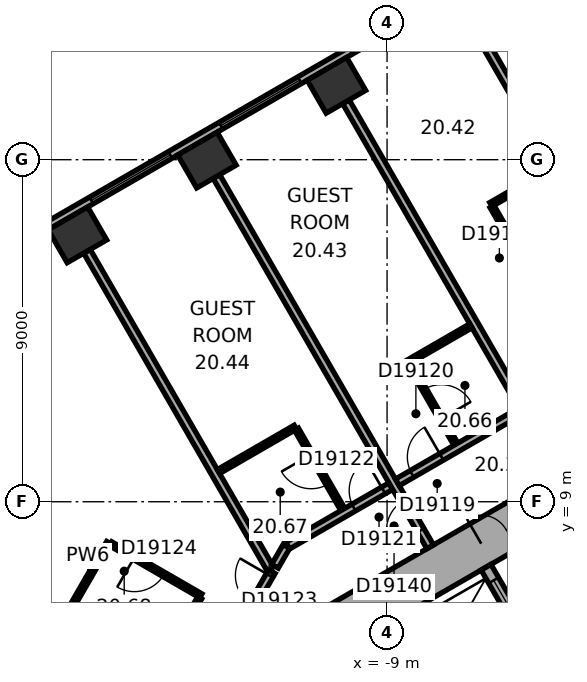
"""IFC4 building model, lengths in metres.
Left out: names, types, materials, properties, quantities, classifications, styles, units other than length and angle.
Written with IfcOpenShell. Run it as: python <this file> out.ifc"""

import sys

from ifc_helpers import new_model, si_unit, direction, frame, frame_2d, origin, origin_2d, place, context, subcontext, project, spatial, rectangle, extrude, element, fill, save


model = new_model("IFC4")
c1 = context("Model", 3, precision=1e-05, world=origin(), true_north=direction((0.0, 1.0)))
c2 = subcontext(c1, "Body", "Model", "MODEL_VIEW")
j1 = project(units=[si_unit("LENGTHUNIT", "METRE"), si_unit("PLANEANGLEUNIT", "RADIAN")], contexts=[c1])
p1 = place(None, origin())
s1 = spatial("IfcSite", under=j1, at=p1, CompositionType="ELEMENT")
p2 = place(p1, origin())
s2 = spatial("IfcBuilding", under=s1, at=p2, CompositionType="ELEMENT")
p3 = place(p2, frame((0.0, 0.0, 90.2)))
s3 = spatial("IfcBuildingStorey", under=s2, at=p3, CompositionType="ELEMENT", Elevation=90.2)
for number, where, z_axis, x_axis in (
    (1, (-10.333, 19.957, 0.0), (0.0, 0.0, 1.0), (-0.866, -0.5, 0.0)),
    (2, (-13.74, 17.99, 0.0), (0.0, 0.0, 1.0), (-0.866, -0.5, 0.0)),
    (3, (-17.148, 16.023, 0.0), (0.0, 0.0, 1.0), (-0.866, -0.5, 0.0)),
):
    element("IfcColumn", number, at=place(p3, frame(where, z_axis=z_axis, x_axis=x_axis)), inside=s3, PredefinedType="COLUMN", context=c2, shape_type="SweptSolid", body=[
        extrude(rectangle(XDim=1.2, YDim=1.0, at=origin_2d()), origin(), (0.0, 0.0, 1.0), 3.3),
    ])
p4 = place(p3, frame((0.3, 11.836, 0.0), z_axis=(0.0, 0.0, 1.0), x_axis=(-0.866021384402, -0.500006961711, 0.0)))
e4 = element("IfcWall", 4, at=p4, inside=s3, PredefinedType="SHEAR", context=c2, shape_type="SweptSolid", body=[
    extrude(rectangle(XDim=12.355, YDim=1.2, at=frame_2d((6.178, 0.0))), origin(), (0.0, 0.0, 1.0), 3.3),
])
p5 = place(p4, frame((6.378, 0.0, 0.0)))
e5 = element("IfcOpeningElement", 5, at=p5, cuts=e4, PredefinedType="OPENING", context=c2, shape_type="SweptSolid", body=[
    extrude(rectangle(XDim=1.5, YDim=2.1, at=frame_2d((0.75, 1.05))), frame((0.0, 0.61, 0.0), z_axis=(0.0, -1.0, 0.0), x_axis=(1.0, 0.0, 0.0)), (0.0, 0.0, 1.0), 1.22),
])
p6 = place(p4, frame((1.828, 0.0, 0.0)))
e6 = element("IfcOpeningElement", 6, at=p6, cuts=e4, PredefinedType="OPENING", context=c2, shape_type="SweptSolid", body=[
    extrude(rectangle(XDim=1.1, YDim=2.1, at=frame_2d((0.55, 1.05))), frame((0.0, 0.61, 0.0), z_axis=(0.0, -1.0, 0.0), x_axis=(1.0, 0.0, 0.0)), (0.0, 0.0, 1.0), 1.22),
])
p7 = place(p3, frame((-3.136, 24.805, 0.0), z_axis=(0.0, 0.0, 1.0), x_axis=(-0.866028291626, -0.499994998079, 0.0)))
e7 = element("IfcWall", 7, at=p7, inside=s3, PredefinedType="STANDARD", context=c2, shape_type="SweptSolid", body=[
    extrude(rectangle(XDim=21.246, YDim=0.2, at=frame_2d((10.623, 0.0))), origin(), (0.0, 0.0, 1.0), 3.3),
])
p8 = place(p7, frame((1.555, 0.0, 0.8)))
e8 = element("IfcOpeningElement", 8, at=p8, cuts=e7, PredefinedType="OPENING", context=c2, shape_type="SweptSolid", body=[
    extrude(rectangle(XDim=2.4, YDim=1.7, at=frame_2d((1.2, 0.85))), frame((0.0, 0.11, 0.0), z_axis=(0.0, -1.0, 0.0), x_axis=(1.0, 0.0, 0.0)), (0.0, 0.0, 1.0), 0.22),
])
p9 = place(p7, frame((5.489, 0.0, 0.8)))
e9 = element("IfcOpeningElement", 9, at=p9, cuts=e7, PredefinedType="OPENING", context=c2, shape_type="SweptSolid", body=[
    extrude(rectangle(XDim=2.4, YDim=1.7, at=frame_2d((1.2, 0.85))), frame((0.0, 0.11, 0.0), z_axis=(0.0, -1.0, 0.0), x_axis=(1.0, 0.0, 0.0)), (0.0, 0.0, 1.0), 0.22),
])
p10 = place(p7, frame((9.424, 0.0, 0.8)))
e10 = element("IfcOpeningElement", 10, at=p10, cuts=e7, PredefinedType="OPENING", context=c2, shape_type="SweptSolid", body=[
    extrude(rectangle(XDim=2.4, YDim=1.7, at=frame_2d((1.2, 0.85))), frame((0.0, 0.11, 0.0), z_axis=(0.0, -1.0, 0.0), x_axis=(1.0, 0.0, 0.0)), (0.0, 0.0, 1.0), 0.22),
])
p11 = place(p7, frame((13.358, 0.0, 0.8)))
e11 = element("IfcOpeningElement", 11, at=p11, cuts=e7, PredefinedType="OPENING", context=c2, shape_type="SweptSolid", body=[
    extrude(rectangle(XDim=2.4, YDim=1.7, at=frame_2d((1.2, 0.85))), frame((0.0, 0.11, 0.0), z_axis=(0.0, -1.0, 0.0), x_axis=(1.0, 0.0, 0.0)), (0.0, 0.0, 1.0), 0.22),
])
p12 = place(p7, frame((17.293, 0.0, 0.8)))
e12 = element("IfcOpeningElement", 12, at=p12, cuts=e7, PredefinedType="OPENING", context=c2, shape_type="SweptSolid", body=[
    extrude(rectangle(XDim=2.4, YDim=1.7, at=frame_2d((1.2, 0.85))), frame((0.0, 0.11, 0.0), z_axis=(0.0, -1.0, 0.0), x_axis=(1.0, 0.0, 0.0)), (0.0, 0.0, 1.0), 0.22),
])
p13 = place(p3, frame((-5.295, 5.372, 0.0), z_axis=(0.0, 0.0, 1.0), x_axis=(-0.500077893725, 0.86598042715, 0.0)))
e13 = element("IfcWall", 13, at=p13, inside=s3, PredefinedType="SHEAR", context=c2, shape_type="SweptSolid", body=[
    extrude(rectangle(XDim=2.2, YDim=0.3, at=frame_2d((1.1, 0.0))), origin(), (0.0, 0.0, 1.0), 3.05),
])
p14 = place(p13, frame((0.7, 0.0, 0.0)))
e14 = element("IfcOpeningElement", 14, at=p14, cuts=e13, PredefinedType="OPENING", context=c2, shape_type="SweptSolid", body=[
    extrude(rectangle(XDim=1.1, YDim=2.1, at=frame_2d((0.55, 1.05))), frame((0.0, 0.16, 0.0), z_axis=(0.0, -1.0, 0.0), x_axis=(1.0, 0.0, 0.0)), (0.0, 0.0, 1.0), 0.32),
])
p15 = place(p3, frame((-17.426, 6.019, 0.0), z_axis=(0.0, 0.0, 1.0), x_axis=(0.50002983664, 0.866008176907, 0.0)))
e15 = element("IfcWall", 15, at=p15, inside=s3, PredefinedType="PARTITIONING", context=c2, shape_type="SweptSolid", body=[
    extrude(rectangle(XDim=2.2, YDim=0.12, at=frame_2d((1.1, 0.0))), origin(), (0.0, 0.0, 1.0), 3.05),
])
p16 = place(p3, frame((-16.898, 15.59, 0.0), z_axis=(0.0, 0.0, 1.0), x_axis=(0.499994742786, -0.866028439017, 0.0)))
e16 = element("IfcWall", 16, at=p16, inside=s3, PredefinedType="PARTITIONING", context=c2, shape_type="SweptSolid", body=[
    extrude(rectangle(XDim=9.65, YDim=0.2, at=frame_2d((4.825, 0.0))), origin(), (0.0, 0.0, 1.0), 3.05),
])
p17 = place(p3, frame((-16.274, 7.895, 0.0), z_axis=(0.0, 0.0, 1.0), x_axis=(0.865997131366, -0.500048966069, 0.0)))
e17 = element("IfcWall", 17, at=p17, inside=s3, PredefinedType="PARTITIONING", context=c2, shape_type="SweptSolid", body=[
    extrude(rectangle(XDim=2.74, YDim=0.12, at=frame_2d((1.37, 0.0))), origin(), (0.0, 0.0, 1.0), 3.05),
])
p18 = place(p17, frame((0.72, 0.0, 0.0)))
e18 = element("IfcOpeningElement", 18, at=p18, cuts=e17, PredefinedType="OPENING", context=c2, shape_type="SweptSolid", body=[
    extrude(rectangle(XDim=0.9, YDim=2.1, at=frame_2d((0.45, 1.05))), frame((0.0, 0.07, 0.0), z_axis=(0.0, -1.0, 0.0), x_axis=(1.0, 0.0, 0.0)), (0.0, 0.0, 1.0), 0.14),
])
p19 = place(p3, frame((-13.931, 6.472, 0.0), z_axis=(0.0, 0.0, 1.0), x_axis=(-0.499739399214, -0.866175809448, 0.0)))
e19 = element("IfcWall", 19, at=p19, inside=s3, PredefinedType="PARTITIONING", context=c2, shape_type="SweptSolid", body=[
    extrude(rectangle(XDim=0.416, YDim=0.12, at=frame_2d((0.208, 0.0))), origin(), (0.0, 0.0, 1.0), 3.05),
])
p20 = place(p3, frame((-13.436, 9.794, 0.0), z_axis=(0.0, 0.0, 1.0), x_axis=(0.866053246676, 0.499951771596, 0.0)))
e20 = element("IfcWall", 20, at=p20, inside=s3, PredefinedType="PARTITIONING", context=c2, shape_type="SweptSolid", body=[
    extrude(rectangle(XDim=2.335, YDim=0.12, at=frame_2d((1.167, 0.0))), origin(), (0.0, 0.0, 1.0), 3.05),
])
p21 = place(p3, frame((-12.032, 7.162, 0.0), z_axis=(0.0, 0.0, 1.0), x_axis=(-0.499951829968, -0.866053212979, 0.0)))
e21 = element("IfcWall", 21, at=p21, inside=s3, PredefinedType="PARTITIONING", context=c2, shape_type="SweptSolid", body=[
    extrude(rectangle(XDim=1.136, YDim=0.2, at=frame_2d((0.568, 0.0))), origin(), (0.0, 0.0, 1.0), 3.05),
])
p22 = place(p21, frame((0.118, 0.0, 0.0)))
e22 = element("IfcOpeningElement", 22, at=p22, cuts=e21, PredefinedType="OPENING", context=c2, shape_type="SweptSolid", body=[
    extrude(rectangle(XDim=0.9, YDim=2.1, at=frame_2d((0.45, 1.05))), frame((0.0, 0.11, 0.0), z_axis=(0.0, -1.0, 0.0), x_axis=(1.0, 0.0, 0.0)), (0.0, 0.0, 1.0), 0.22),
])
p23 = place(p3, frame((-11.65, 7.823, 0.0), z_axis=(0.0, 0.0, 1.0), x_axis=(-0.50012165622, -0.865955154139, 0.0)))
e23 = element("IfcWall", 23, at=p23, inside=s3, PredefinedType="PARTITIONING", context=c2, shape_type="SweptSolid", body=[
    extrude(rectangle(XDim=0.6, YDim=0.2, at=frame_2d((0.3, 0.0))), origin(), (0.0, 0.0, 1.0), 3.05),
])
p24 = place(p3, frame((-11.385, 10.909, 0.0), z_axis=(0.0, 0.0, 1.0), x_axis=(0.500077547548, -0.865980627057, 0.0)))
e24 = element("IfcWall", 24, at=p24, inside=s3, PredefinedType="PARTITIONING", context=c2, shape_type="SweptSolid", body=[
    extrude(rectangle(XDim=2.44, YDim=0.12, at=frame_2d((1.22, 0.0))), origin(), (0.0, 0.0, 1.0), 3.05),
])
p25 = place(p24, frame((0.77, 0.0, 0.0)))
e25 = element("IfcOpeningElement", 25, at=p25, cuts=e24, PredefinedType="OPENING", context=c2, shape_type="SweptSolid", body=[
    extrude(rectangle(XDim=0.9, YDim=2.1, at=frame_2d((0.45, 1.05))), frame((0.0, 0.07, 0.0), z_axis=(0.0, -1.0, 0.0), x_axis=(1.0, 0.0, 0.0)), (0.0, 0.0, 1.0), 0.14),
])
p26 = place(p3, frame((-10.083, 19.524, 0.0), z_axis=(0.0, 0.0, 1.0), x_axis=(0.499999662836, -0.866025598446, 0.0)))
e26 = element("IfcWall", 26, at=p26, inside=s3, PredefinedType="PARTITIONING", context=c2, shape_type="SweptSolid", body=[
    extrude(rectangle(XDim=9.25, YDim=0.2, at=frame_2d((4.625, 0.0))), origin(), (0.0, 0.0, 1.0), 2.6),
])
p27 = place(p3, frame((-8.902, 9.41, 0.0), z_axis=(0.0, 0.0, 1.0), x_axis=(-0.866014299198, -0.500019233215, 0.0)))
e27 = element("IfcWall", 27, at=p27, inside=s3, PredefinedType="PARTITIONING", context=c2, shape_type="SweptSolid", body=[
    extrude(rectangle(XDim=3.133, YDim=0.2, at=frame_2d((1.567, 0.0))), origin(), (0.0, 0.0, 1.0), 3.05),
])
p28 = place(p27, frame((0.225, 0.0, 0.0)))
e28 = element("IfcOpeningElement", 28, at=p28, cuts=e27, PredefinedType="OPENING", context=c2, shape_type="SweptSolid", body=[
    extrude(rectangle(XDim=0.9, YDim=2.1, at=frame_2d((0.45, 1.05))), frame((0.0, 0.11, 0.0), z_axis=(0.0, -1.0, 0.0), x_axis=(1.0, 0.0, 0.0)), (0.0, 0.0, 1.0), 0.22),
])
p29 = place(p3, frame((-8.44, 12.679, 0.0), z_axis=(0.0, 0.0, 1.0), x_axis=(0.866044365799, 0.499967155389, 0.0)))
e29 = element("IfcWall", 29, at=p29, inside=s3, PredefinedType="PARTITIONING", context=c2, shape_type="SweptSolid", body=[
    extrude(rectangle(XDim=1.9, YDim=0.12, at=frame_2d((0.95, 0.0))), origin(), (0.0, 0.0, 1.0), 3.05),
])
p30 = place(p3, frame((-7.865, 7.814, 0.0), z_axis=(0.0, 0.0, 1.0), x_axis=(-0.500004234368, 0.866022959057, 0.0)))
e30 = element("IfcWall", 30, at=p30, inside=s3, PredefinedType="PARTITIONING", context=c2, shape_type="SweptSolid", body=[
    extrude(rectangle(XDim=11.25, YDim=0.2, at=frame_2d((5.625, 0.0))), origin(), (0.0, 0.0, 1.0), 3.05),
])
p31 = place(p30, frame((0.5, 0.0, 0.0)))
e31 = element("IfcOpeningElement", 31, at=p31, cuts=e30, PredefinedType="OPENING", context=c2, shape_type="SweptSolid", body=[
    extrude(rectangle(XDim=0.9, YDim=2.1, at=frame_2d((0.45, 1.05))), frame((0.0, 0.11, 0.0), z_axis=(0.0, -1.0, 0.0), x_axis=(1.0, 0.0, 0.0)), (0.0, 0.0, 1.0), 0.22),
])
p32 = place(p3, frame((-7.19, 10.513, 0.0), z_axis=(0.0, 0.0, 1.0), x_axis=(-0.499959183527, 0.866048967903, 0.0)))
e32 = element("IfcWall", 32, at=p32, inside=s3, PredefinedType="PARTITIONING", context=c2, shape_type="SweptSolid", body=[
    extrude(rectangle(XDim=2.44, YDim=0.12, at=frame_2d((1.22, 0.0))), origin(), (0.0, 0.0, 1.0), 3.05),
])
p33 = place(p32, frame((0.77, 0.0, 0.0)))
e33 = element("IfcOpeningElement", 33, at=p33, cuts=e32, PredefinedType="OPENING", context=c2, shape_type="SweptSolid", body=[
    extrude(rectangle(XDim=0.9, YDim=2.1, at=frame_2d((0.45, 1.05))), frame((0.0, 0.07, 0.0), z_axis=(0.0, -1.0, 0.0), x_axis=(1.0, 0.0, 0.0)), (0.0, 0.0, 1.0), 0.14),
])
p34 = place(p3, frame((-6.676, 21.492, 0.0), z_axis=(0.0, 0.0, 1.0), x_axis=(0.500011263043, -0.866018900966, 0.0)))
e34 = element("IfcWall", 34, at=p34, inside=s3, PredefinedType="PARTITIONING", context=c2, shape_type="SweptSolid", body=[
    extrude(rectangle(XDim=8.049, YDim=0.2, at=frame_2d((4.024, 0.0))), origin(), (0.0, 0.0, 1.0), 3.05),
])
p35 = place(p3, frame((-6.268, 16.82, 0.0), z_axis=(0.0, 0.0, 1.0), x_axis=(0.866002662425, 0.500039387122, 0.0)))
e35 = element("IfcWall", 35, at=p35, inside=s3, PredefinedType="PARTITIONING", context=c2, shape_type="SweptSolid", body=[
    extrude(rectangle(XDim=1.4, YDim=0.12, at=frame_2d((0.7, 0.0))), origin(), (0.0, 0.0, 1.0), 3.05),
])
p36 = place(p3, frame((-4.968, 14.569, 0.0), z_axis=(0.0, 0.0, 1.0), x_axis=(-0.500046963369, 0.865998287773, 0.0)))
e36 = element("IfcWall", 36, at=p36, inside=s3, PredefinedType="PARTITIONING", context=c2, shape_type="SweptSolid", body=[
    extrude(rectangle(XDim=2.54, YDim=0.12, at=frame_2d((1.27, 0.0))), origin(), (0.0, 0.0, 1.0), 3.05),
])
p37 = place(p36, frame((0.82, 0.0, 0.0)))
e37 = element("IfcOpeningElement", 37, at=p37, cuts=e36, PredefinedType="OPENING", context=c2, shape_type="SweptSolid", body=[
    extrude(rectangle(XDim=0.9, YDim=2.1, at=frame_2d((0.45, 1.05))), frame((0.0, 0.07, 0.0), z_axis=(0.0, -1.0, 0.0), x_axis=(1.0, 0.0, 0.0)), (0.0, 0.0, 1.0), 0.14),
])
p38 = place(p3, frame((-4.309, 12.061, 0.0), z_axis=(0.0, 0.0, 1.0), x_axis=(-0.866020679205, -0.500008183122, 0.0)))
e38 = element("IfcWall", 38, at=p38, inside=s3, PredefinedType="PARTITIONING", context=c2, shape_type="SweptSolid", body=[
    extrude(rectangle(XDim=5.104, YDim=0.2, at=frame_2d((2.552, 0.0))), origin(), (0.0, 0.0, 1.0), 3.05),
])
p39 = place(p38, frame((0.185, 0.0, 0.0)))
e39 = element("IfcOpeningElement", 39, at=p39, cuts=e38, PredefinedType="OPENING", context=c2, shape_type="SweptSolid", body=[
    extrude(rectangle(XDim=0.9, YDim=2.1, at=frame_2d((0.45, 1.05))), frame((0.0, 0.11, 0.0), z_axis=(0.0, -1.0, 0.0), x_axis=(1.0, 0.0, 0.0)), (0.0, 0.0, 1.0), 0.22),
])
p40 = place(p38, frame((3.761, 0.0, 0.0)))
e40 = element("IfcOpeningElement", 40, at=p40, cuts=e38, PredefinedType="OPENING", context=c2, shape_type="SweptSolid", body=[
    extrude(rectangle(XDim=0.9, YDim=2.1, at=frame_2d((0.45, 1.05))), frame((0.0, 0.11, 0.0), z_axis=(0.0, -1.0, 0.0), x_axis=(1.0, 0.0, 0.0)), (0.0, 0.0, 1.0), 0.22),
])
p41 = place(p10, origin())
e41 = element("IfcWindow", 41, at=p41, inside=s3, PartitioningType="SINGLE_PANEL", PredefinedType="WINDOW", context=c2, shape_type="SweptSolid", body=[
    extrude(rectangle(XDim=2.4, YDim=1.7, at=frame_2d((1.2, 0.85))), frame((0.0, 0.03, 0.0), z_axis=(0.0, -1.0, 0.0), x_axis=(1.0, 0.0, 0.0)), (0.0, 0.0, 1.0), 0.06),
])
fill(e10, e41)
p42 = place(p11, origin())
e42 = element("IfcWindow", 42, at=p42, inside=s3, PartitioningType="SINGLE_PANEL", PredefinedType="WINDOW", context=c2, shape_type="SweptSolid", body=[
    extrude(rectangle(XDim=2.4, YDim=1.7, at=frame_2d((1.2, 0.85))), frame((0.0, 0.03, 0.0), z_axis=(0.0, -1.0, 0.0), x_axis=(1.0, 0.0, 0.0)), (0.0, 0.0, 1.0), 0.06),
])
fill(e11, e42)
p43 = place(p5, origin())
e43 = element("IfcDoor", 43, at=p43, inside=s3, OperationType="DOUBLE_DOOR_SINGLE_SWING", PredefinedType="DOOR", context=c2, shape_type="SweptSolid", body=[
    extrude(rectangle(XDim=1.5, YDim=2.1, at=frame_2d((0.75, 1.05))), frame((0.0, 0.025, 0.0), z_axis=(0.0, -1.0, 0.0), x_axis=(1.0, 0.0, 0.0)), (0.0, 0.0, 1.0), 0.05),
])
fill(e5, e43)
p44 = place(p14, origin())
e44 = element("IfcDoor", 44, at=p44, inside=s3, OperationType="DOUBLE_DOOR_SLIDING", PredefinedType="DOOR", context=c2, shape_type="SweptSolid", body=[
    extrude(rectangle(XDim=1.1, YDim=2.1, at=frame_2d((0.55, 1.05))), frame((0.0, 0.025, 0.0), z_axis=(0.0, -1.0, 0.0), x_axis=(1.0, 0.0, 0.0)), (0.0, 0.0, 1.0), 0.05),
])
fill(e14, e44)
p45 = place(p37, origin())
e45 = element("IfcDoor", 45, at=p45, inside=s3, OperationType="SINGLE_SWING_LEFT", PredefinedType="DOOR", context=c2, shape_type="SweptSolid", body=[
    extrude(rectangle(XDim=0.9, YDim=2.1, at=frame_2d((0.45, 1.05))), frame((0.0, 0.025, 0.0), z_axis=(0.0, -1.0, 0.0), x_axis=(1.0, 0.0, 0.0)), (0.0, 0.0, 1.0), 0.05),
])
fill(e37, e45)
p46 = place(p40, origin())
e46 = element("IfcDoor", 46, at=p46, inside=s3, OperationType="SINGLE_SWING_LEFT", PredefinedType="DOOR", context=c2, shape_type="SweptSolid", body=[
    extrude(rectangle(XDim=0.9, YDim=2.1, at=frame_2d((0.45, 1.05))), frame((0.0, 0.025, 0.0), z_axis=(0.0, -1.0, 0.0), x_axis=(1.0, 0.0, 0.0)), (0.0, 0.0, 1.0), 0.05),
])
fill(e40, e46)
p47 = place(p33, origin())
e47 = element("IfcDoor", 47, at=p47, inside=s3, OperationType="SINGLE_SWING_LEFT", PredefinedType="DOOR", context=c2, shape_type="SweptSolid", body=[
    extrude(rectangle(XDim=0.9, YDim=2.1, at=frame_2d((0.45, 1.05))), frame((0.0, 0.025, 0.0), z_axis=(0.0, -1.0, 0.0), x_axis=(1.0, 0.0, 0.0)), (0.0, 0.0, 1.0), 0.05),
])
fill(e33, e47)
p48 = place(p28, origin())
e48 = element("IfcDoor", 48, at=p48, inside=s3, OperationType="SINGLE_SWING_LEFT", PredefinedType="DOOR", context=c2, shape_type="SweptSolid", body=[
    extrude(rectangle(XDim=0.9, YDim=2.1, at=frame_2d((0.45, 1.05))), frame((0.0, 0.025, 0.0), z_axis=(0.0, -1.0, 0.0), x_axis=(1.0, 0.0, 0.0)), (0.0, 0.0, 1.0), 0.05),
])
fill(e28, e48)
p49 = place(p25, origin())
e49 = element("IfcDoor", 49, at=p49, inside=s3, OperationType="SINGLE_SWING_LEFT", PredefinedType="DOOR", context=c2, shape_type="SweptSolid", body=[
    extrude(rectangle(XDim=0.9, YDim=2.1, at=frame_2d((0.45, 1.05))), frame((0.0, 0.025, 0.0), z_axis=(0.0, -1.0, 0.0), x_axis=(1.0, 0.0, 0.0)), (0.0, 0.0, 1.0), 0.05),
])
fill(e25, e49)
p50 = place(p22, origin())
e50 = element("IfcDoor", 50, at=p50, inside=s3, OperationType="SINGLE_SWING_LEFT", PredefinedType="DOOR", context=c2, shape_type="SweptSolid", body=[
    extrude(rectangle(XDim=0.9, YDim=2.1, at=frame_2d((0.45, 1.05))), frame((0.0, 0.025, 0.0), z_axis=(0.0, -1.0, 0.0), x_axis=(1.0, 0.0, 0.0)), (0.0, 0.0, 1.0), 0.05),
])
fill(e22, e50)
p51 = place(p18, origin())
e51 = element("IfcDoor", 51, at=p51, inside=s3, OperationType="SINGLE_SWING_LEFT", PredefinedType="DOOR", context=c2, shape_type="SweptSolid", body=[
    extrude(rectangle(XDim=0.9, YDim=2.1, at=frame_2d((0.45, 1.05))), frame((0.0, 0.025, 0.0), z_axis=(0.0, -1.0, 0.0), x_axis=(1.0, 0.0, 0.0)), (0.0, 0.0, 1.0), 0.05),
])
fill(e18, e51)
p52 = place(p31, origin())
e52 = element("IfcDoor", 52, at=p52, inside=s3, OperationType="SINGLE_SWING_LEFT", PredefinedType="DOOR", context=c2, shape_type="SweptSolid", body=[
    extrude(rectangle(XDim=0.9, YDim=2.1, at=frame_2d((0.45, 1.05))), frame((0.0, 0.025, 0.0), z_axis=(0.0, -1.0, 0.0), x_axis=(1.0, 0.0, 0.0)), (0.0, 0.0, 1.0), 0.05),
])
fill(e31, e52)
save(model, sys.argv[1])
